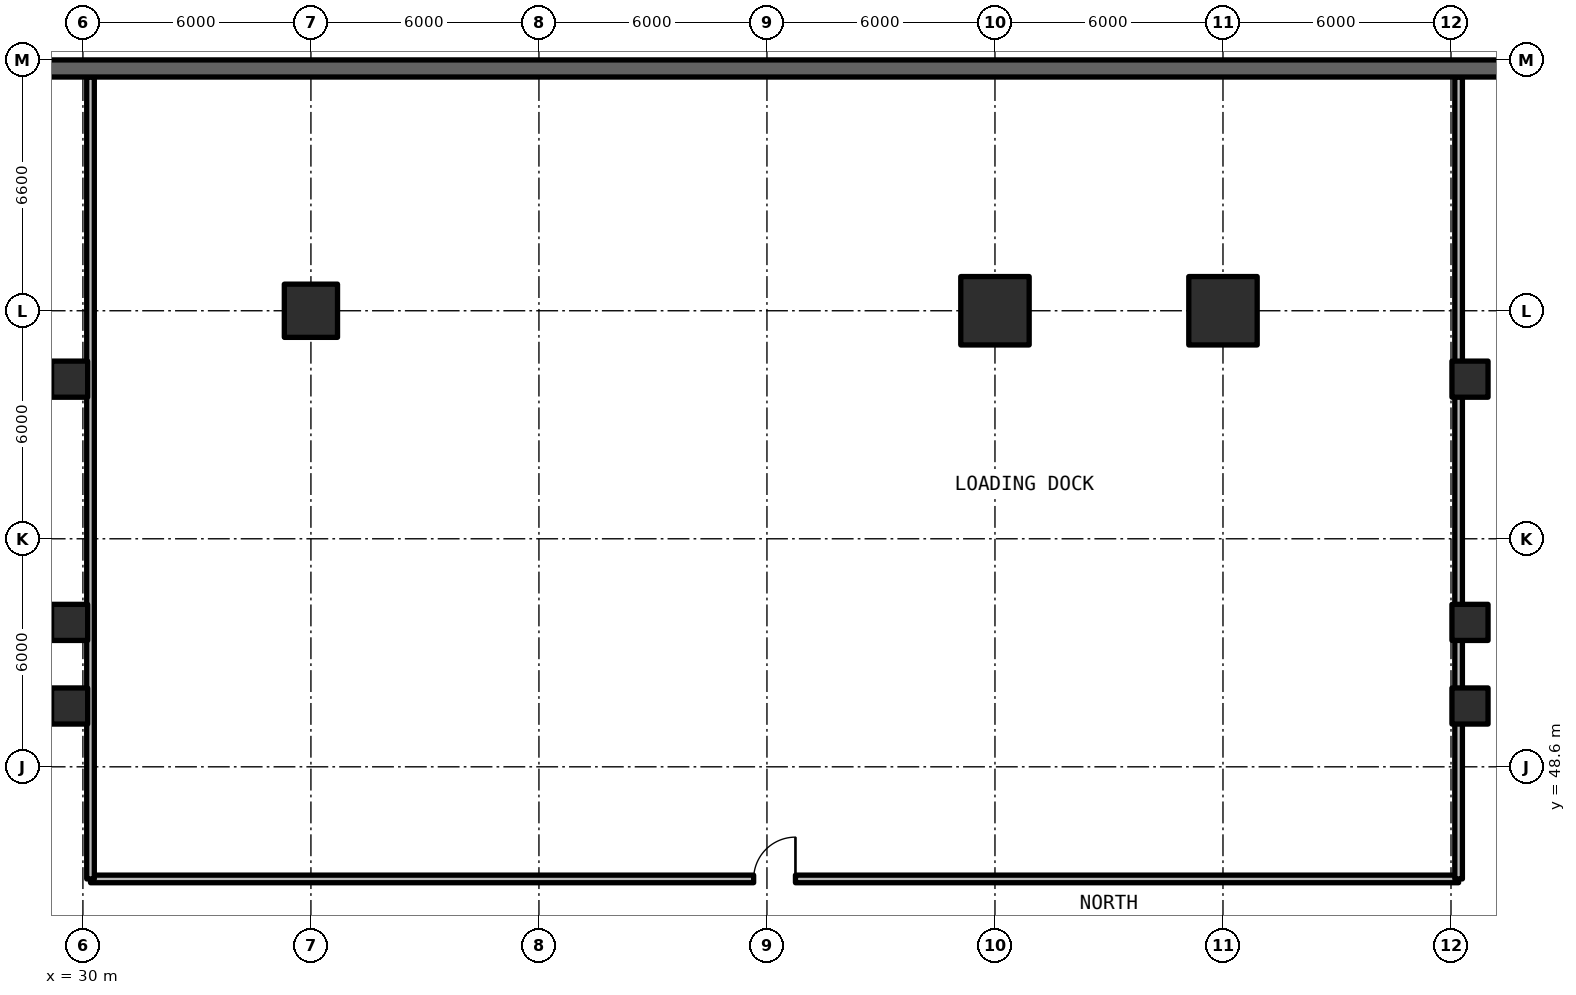
"""IFC4 building model, lengths in metres.
Left out: names, types, materials, properties, quantities, classifications, styles, units other than length and angle.
Written with IfcOpenShell. Run it as: python <this file> out.ifc"""

import sys

from ifc_helpers import new_model, si_unit, direction, frame, frame_2d, origin, origin_2d, place, context, subcontext, project, spatial, rectangle, circle, extrude, element, fill, save


model = new_model("IFC4")
c1 = context("Model", 3, precision=1e-05, world=origin(), true_north=direction((0.0, 1.0)))
c2 = subcontext(c1, "Body", "Model", "MODEL_VIEW")
j1 = project(units=[si_unit("LENGTHUNIT", "METRE"), si_unit("PLANEANGLEUNIT", "RADIAN")], contexts=[c1])
p1 = place(None, origin())
s1 = spatial("IfcSite", under=j1, at=p1, CompositionType="ELEMENT")
p2 = place(p1, origin())
s2 = spatial("IfcBuilding", under=s1, at=p2, CompositionType="ELEMENT")
p3 = place(p2, frame((0.0, 0.0, -4.62)))
s3 = spatial("IfcBuildingStorey", under=s2, at=p3, CompositionType="ELEMENT", Elevation=-4.62)
p4 = place(p3, frame((36.0, 60.6, 0.0), z_axis=(0.0, 0.0, 1.0), x_axis=(1.0, 0.0, 0.0)))
e1 = element("IfcColumn", 1, at=p4, inside=s3, PredefinedType="COLUMN", context=c2, shape_type="SweptSolid", body=[
    extrude(circle(Radius=0.7, at=origin_2d()), origin(), (0.0, 0.0, 1.0), 4.62),
])
for number, where, z_axis, x_axis in (
    (2, (54.0, 60.6, 0.0), (0.0, 0.0, 1.0), (1.0, 0.0, 0.0)),
    (3, (60.0, 60.6, 0.0), (0.0, 0.0, 1.0), (1.0, 0.0, 0.0)),
):
    element("IfcColumn", number, at=place(p3, frame(where, z_axis=z_axis, x_axis=x_axis)), inside=s3, PredefinedType="COLUMN", context=c2, shape_type="SweptSolid", body=[
        extrude(rectangle(XDim=1.8, YDim=1.8, at=origin_2d()), origin(), (0.0, 0.0, 1.0), 4.62),
    ])
for number, where, z_axis, x_axis in (
    (4, (29.65, 52.4, 0.0), (0.0, 0.0, 1.0), (1.0, 0.0, 0.0)),
    (5, (29.65, 50.2, 0.0), (0.0, 0.0, 1.0), (1.0, 0.0, 0.0)),
    (6, (29.65, 58.8, 0.0), (0.0, 0.0, 1.0), (1.0, 0.0, 0.0)),
    (7, (66.5, 52.4, 0.0), (0.0, 0.0, 1.0), (1.0, 0.0, 0.0)),
    (8, (66.5, 50.2, 0.0), (0.0, 0.0, 1.0), (1.0, 0.0, 0.0)),
    (9, (66.5, 58.8, 0.0), (0.0, 0.0, 1.0), (1.0, 0.0, 0.0)),
):
    element("IfcColumn", number, at=place(p3, frame(where, z_axis=z_axis, x_axis=x_axis)), inside=s3, PredefinedType="COLUMN", context=c2, shape_type="SweptSolid", body=[
        extrude(rectangle(XDim=0.95, YDim=0.95, at=origin_2d()), origin(), (0.0, 0.0, 1.0), 4.34),
    ])
p5 = place(p3, frame((113.775, 66.975, 0.0), z_axis=(0.0, 0.0, 1.0), x_axis=(-1.0, 0.0, 0.0)))
e10 = element("IfcWall", 10, at=p5, inside=s3, PredefinedType="USERDEFINED", context=c2, shape_type="SweptSolid", body=[
    extrude(rectangle(XDim=113.55, YDim=0.45, at=frame_2d((56.775, 0.0))), origin(), (0.0, 0.0, 1.0), 4.34),
])
p6 = place(p3, frame((30.2, 45.65, 0.0), z_axis=(0.0, 0.0, 1.0), x_axis=(1.0, 0.0, 0.0)))
e11 = element("IfcWall", 11, at=p6, inside=s3, PredefinedType="SOLIDWALL", context=c2, shape_type="SweptSolid", body=[
    extrude(rectangle(XDim=36.0, YDim=0.2, at=frame_2d((18.0, 0.0))), origin(), (0.0, 0.0, 1.0), 3.56),
])
p7 = place(p6, frame((17.45, 0.0, 0.0)))
e12 = element("IfcOpeningElement", 12, at=p7, cuts=e11, PredefinedType="OPENING", context=c2, shape_type="SweptSolid", body=[
    extrude(rectangle(XDim=1.1, YDim=2.15, at=frame_2d((0.55, 1.075))), frame((0.0, 0.11, 0.0), z_axis=(0.0, -1.0, 0.0), x_axis=(1.0, 0.0, 0.0)), (0.0, 0.0, 1.0), 0.22),
])
for number, where, z_axis, x_axis in (
    (13, (30.2, 45.65, 0.0), (0.0, 0.0, 1.0), (0.0, 1.0, 0.0)),
    (14, (66.2, 45.65, 0.0), (0.0, 0.0, 1.0), (0.0, 1.0, 0.0)),
):
    element("IfcWall", number, at=place(p3, frame(where, z_axis=z_axis, x_axis=x_axis)), inside=s3, PredefinedType="SOLIDWALL", context=c2, shape_type="SweptSolid", body=[
        extrude(rectangle(XDim=21.1, YDim=0.2, at=frame_2d((10.55, 0.0))), origin(), (0.0, 0.0, 1.0), 3.56),
    ])
p8 = place(p7, origin())
e15 = element("IfcDoor", 15, at=p8, inside=s3, OperationType="SINGLE_SWING_RIGHT", PredefinedType="DOOR", context=c2, shape_type="SweptSolid", body=[
    extrude(rectangle(XDim=1.1, YDim=2.15, at=frame_2d((0.55, 1.075))), frame((0.0, 0.025, 0.0), z_axis=(0.0, -1.0, 0.0), x_axis=(1.0, 0.0, 0.0)), (0.0, 0.0, 1.0), 0.05),
])
fill(e12, e15)
save(model, sys.argv[1])
